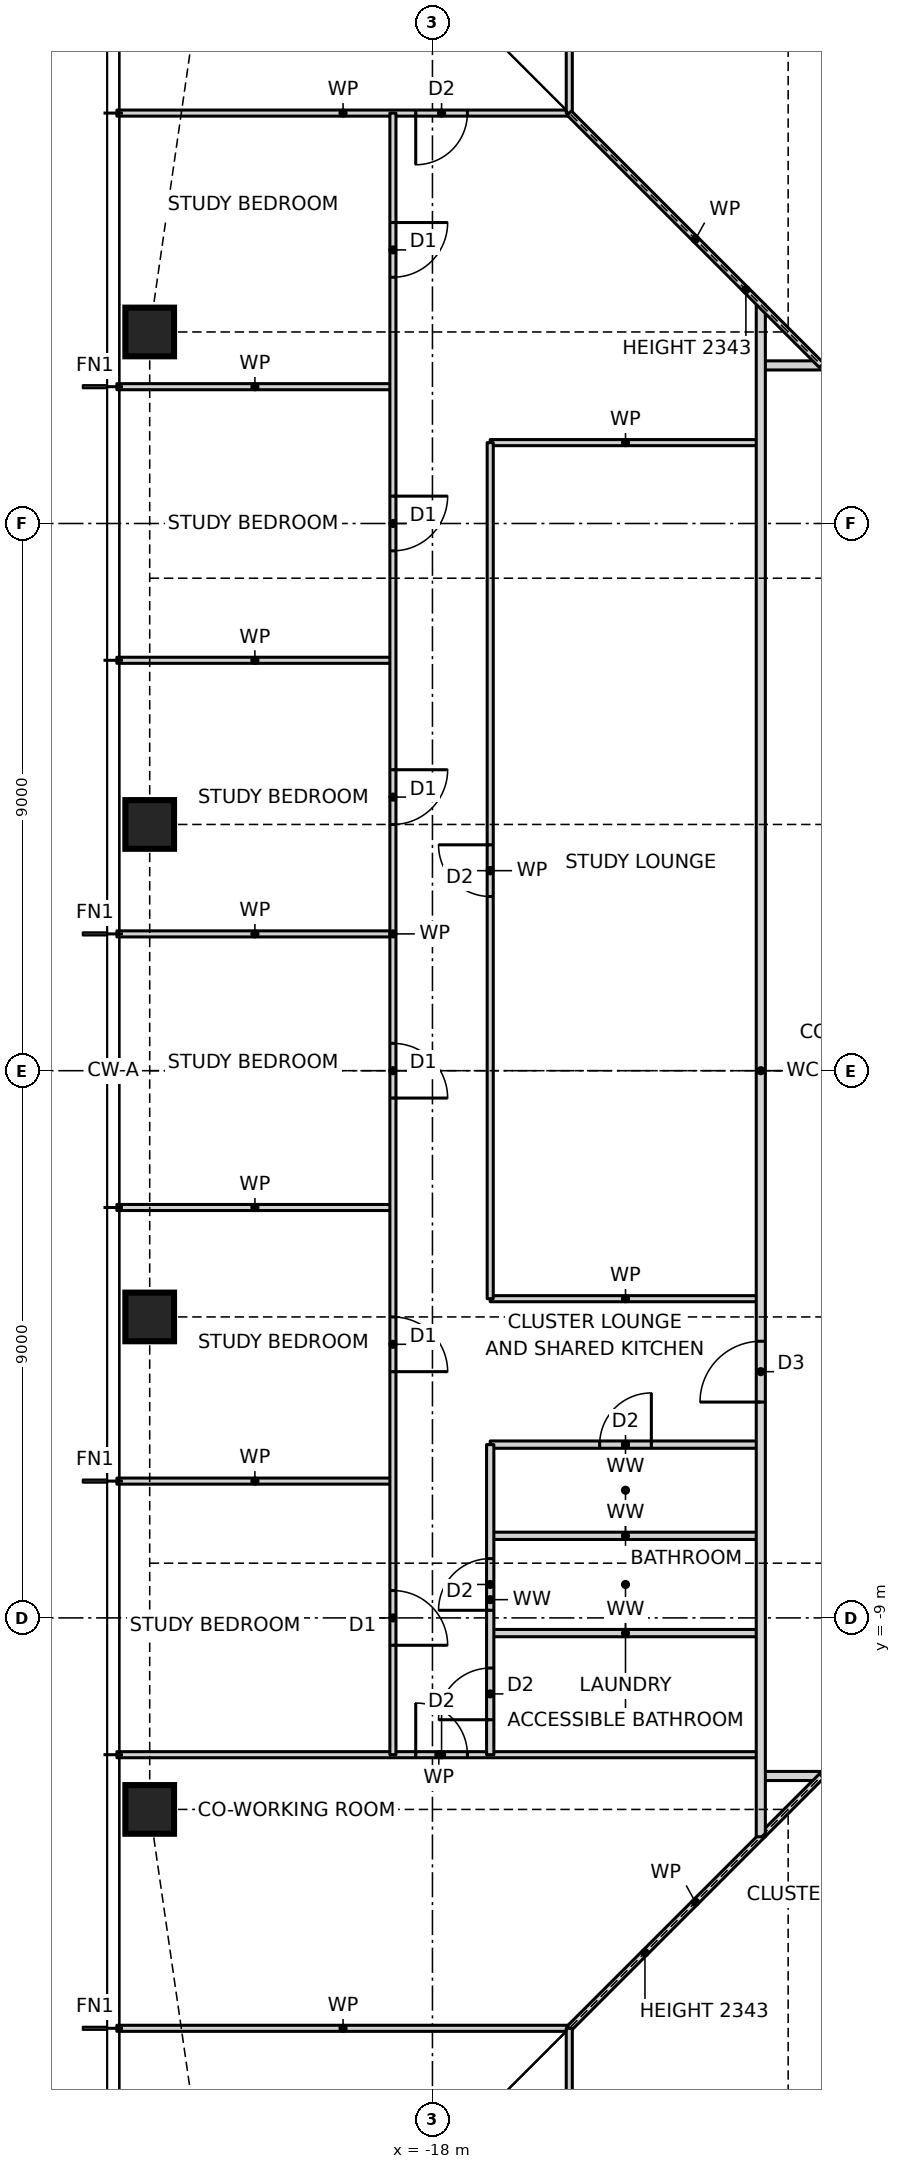
"""IFC4 building model, lengths in metres.
Left out: names, types, materials, properties, quantities, classifications, styles, units other than length and angle.
Written with IfcOpenShell. Run it as: python <this file> out.ifc"""

import sys

from ifc_helpers import new_model, si_unit, direction, frame, frame_2d, origin, origin_2d, place, context, subcontext, project, spatial, rectangle, hollow_rectangle, extrude, element, fill, save


model = new_model("IFC4")
c1 = context("Model", 3, precision=1e-05, world=origin(), true_north=direction((0.0, 1.0)))
c2 = subcontext(c1, "Body", "Model", "MODEL_VIEW")
j1 = project(units=[si_unit("LENGTHUNIT", "METRE"), si_unit("PLANEANGLEUNIT", "RADIAN")], contexts=[c1])
p1 = place(None, origin())
s1 = spatial("IfcSite", under=j1, at=p1, CompositionType="ELEMENT")
p2 = place(p1, origin())
s2 = spatial("IfcBuilding", under=s1, at=p2, CompositionType="ELEMENT")
p3 = place(p2, frame((0.0, 0.0, 50.0)))
s3 = spatial("IfcBuildingStorey", under=s2, at=p3, CompositionType="ELEMENT", Elevation=50.0)
for number, where, z_axis, x_axis in (
    (1, (-22.65, 12.15, 0.0), (0.0, 0.0, 1.0), (1.0, 0.0, 0.0)),
    (2, (-22.65, 4.05, 0.0), (0.0, 0.0, 1.0), (1.0, 0.0, 0.0)),
    (3, (-22.65, -4.05, 0.0), (0.0, 0.0, 1.0), (1.0, 0.0, 0.0)),
    (4, (-22.65, -12.15, 0.0), (0.0, 0.0, 1.0), (1.0, 0.0, 0.0)),
):
    element("IfcColumn", number, at=place(p3, frame(where, z_axis=z_axis, x_axis=x_axis)), inside=s3, PredefinedType="COLUMN", context=c2, shape_type="SweptSolid", body=[
        extrude(hollow_rectangle(XDim=0.8, YDim=0.8, WallThickness=0.09, at=origin_2d()), origin(), (0.0, 0.0, 1.0), 3.5),
    ])
p4 = place(p3, frame((-23.19, -15.75, 0.0), z_axis=(0.0, 0.0, 1.0), x_axis=(1.0, 0.0, 0.0)))
e5 = element("IfcWall", 5, at=p4, inside=s3, PredefinedType="PARTITIONING", context=c2, shape_type="SweptSolid", body=[
    extrude(rectangle(XDim=7.44, YDim=0.1, at=frame_2d((3.72, 0.0))), origin(), (0.0, 0.0, 1.0), 3.27),
])
p5 = place(p3, frame((-12.6, -11.6, 0.0), z_axis=(0.0, 0.0, 1.0), x_axis=(1.0, 0.0, 0.0)))
e6 = element("IfcWall", 6, at=p5, inside=s3, PredefinedType="PARTITIONING", context=c2, shape_type="SweptSolid", body=[
    extrude(rectangle(XDim=24.2, YDim=0.15, at=frame_2d((12.1, 0.0))), origin(), (0.0, 0.0, 1.0), 3.27),
])
p6 = place(p5, frame((1.74, 0.0, 0.0)))
e7 = element("IfcOpeningElement", 7, at=p6, cuts=e6, PredefinedType="OPENING", context=c2, shape_type="SweptSolid", body=[
    extrude(rectangle(XDim=1.0, YDim=2.1, at=frame_2d((0.5, 1.05))), frame((0.0, 0.085, 0.0), z_axis=(0.0, -1.0, 0.0), x_axis=(1.0, 0.0, 0.0)), (0.0, 0.0, 1.0), 0.17),
])
p7 = place(p5, frame((22.025, 0.0, 0.0)))
e8 = element("IfcOpeningElement", 8, at=p7, cuts=e6, PredefinedType="OPENING", context=c2, shape_type="SweptSolid", body=[
    extrude(rectangle(XDim=1.0, YDim=2.1, at=frame_2d((0.5, 1.05))), frame((0.0, 0.085, 0.0), z_axis=(0.0, -1.0, 0.0), x_axis=(1.0, 0.0, 0.0)), (0.0, 0.0, 1.0), 0.17),
])
p8 = place(p3, frame((-23.19, -11.25, 0.0), z_axis=(0.0, 0.0, 1.0), x_axis=(1.0, 0.0, 0.0)))
e9 = element("IfcWall", 9, at=p8, inside=s3, PredefinedType="PARTITIONING", context=c2, shape_type="SweptSolid", body=[
    extrude(rectangle(XDim=10.59, YDim=0.1, at=frame_2d((5.295, 0.0))), origin(), (0.0, 0.0, 1.0), 3.27),
])
p9 = place(p8, frame((4.915, 0.0, 0.0)))
e10 = element("IfcOpeningElement", 10, at=p9, cuts=e9, PredefinedType="OPENING", context=c2, shape_type="SweptSolid", body=[
    extrude(rectangle(XDim=0.85, YDim=2.1, at=frame_2d((0.425, 1.05))), frame((0.0, 0.06, 0.0), z_axis=(0.0, -1.0, 0.0), x_axis=(1.0, 0.0, 0.0)), (0.0, 0.0, 1.0), 0.12),
])
for number, where, z_axis, x_axis in (
    (11, (-17.05, -9.25, 0.0), (0.0, 0.0, 1.0), (1.0, 0.0, 0.0)),
    (12, (-17.05, -7.65, 0.0), (0.0, 0.0, 1.0), (1.0, 0.0, 0.0)),
):
    element("IfcWall", number, at=place(p3, frame(where, z_axis=z_axis, x_axis=x_axis)), inside=s3, PredefinedType="PARTITIONING", context=c2, shape_type="SweptSolid", body=[
        extrude(rectangle(XDim=4.45, YDim=0.12, at=frame_2d((2.225, 0.0))), origin(), (0.0, 0.0, 1.0), 3.27),
    ])
p10 = place(p3, frame((-23.19, -6.75, 0.0), z_axis=(0.0, 0.0, 1.0), x_axis=(1.0, 0.0, 0.0)))
e13 = element("IfcWall", 13, at=p10, inside=s3, PredefinedType="PARTITIONING", context=c2, shape_type="SweptSolid", body=[
    extrude(rectangle(XDim=4.54, YDim=0.1, at=frame_2d((2.27, 0.0))), origin(), (0.0, 0.0, 1.0), 3.27),
])
p11 = place(p3, frame((-17.05, -6.15, 0.0), z_axis=(0.0, 0.0, 1.0), x_axis=(1.0, 0.0, 0.0)))
e14 = element("IfcWall", 14, at=p11, inside=s3, PredefinedType="PARTITIONING", context=c2, shape_type="SweptSolid", body=[
    extrude(rectangle(XDim=4.45, YDim=0.12, at=frame_2d((2.225, 0.0))), origin(), (0.0, 0.0, 1.0), 3.27),
])
p12 = place(p11, frame((1.8, 0.0, 0.0)))
e15 = element("IfcOpeningElement", 15, at=p12, cuts=e14, PredefinedType="OPENING", context=c2, shape_type="SweptSolid", body=[
    extrude(rectangle(XDim=0.85, YDim=2.1, at=frame_2d((0.425, 1.05))), frame((0.0, 0.07, 0.0), z_axis=(0.0, -1.0, 0.0), x_axis=(1.0, 0.0, 0.0)), (0.0, 0.0, 1.0), 0.14),
])
p13 = place(p3, frame((-17.05, -3.75, 0.0), z_axis=(0.0, 0.0, 1.0), x_axis=(1.0, 0.0, 0.0)))
e16 = element("IfcWall", 16, at=p13, inside=s3, PredefinedType="PARTITIONING", context=c2, shape_type="SweptSolid", body=[
    extrude(rectangle(XDim=4.45, YDim=0.1, at=frame_2d((2.225, 0.0))), origin(), (0.0, 0.0, 1.0), 3.27),
])
for number, where, z_axis, x_axis in (
    (17, (-23.19, -2.25, 0.0), (0.0, 0.0, 1.0), (1.0, 0.0, 0.0)),
    (18, (-23.19, 2.25, 0.0), (0.0, 0.0, 1.0), (1.0, 0.0, 0.0)),
    (19, (-23.19, 6.75, 0.0), (0.0, 0.0, 1.0), (1.0, 0.0, 0.0)),
):
    element("IfcWall", number, at=place(p3, frame(where, z_axis=z_axis, x_axis=x_axis)), inside=s3, PredefinedType="PARTITIONING", context=c2, shape_type="SweptSolid", body=[
        extrude(rectangle(XDim=4.54, YDim=0.1, at=frame_2d((2.27, 0.0))), origin(), (0.0, 0.0, 1.0), 3.27),
    ])
p14 = place(p3, frame((-17.05, 10.33, 0.0), z_axis=(0.0, 0.0, 1.0), x_axis=(1.0, 0.0, 0.0)))
e20 = element("IfcWall", 20, at=p14, inside=s3, PredefinedType="PARTITIONING", context=c2, shape_type="SweptSolid", body=[
    extrude(rectangle(XDim=4.45, YDim=0.1, at=frame_2d((2.225, 0.0))), origin(), (0.0, 0.0, 1.0), 3.27),
])
p15 = place(p3, frame((-23.19, 11.25, 0.0), z_axis=(0.0, 0.0, 1.0), x_axis=(1.0, 0.0, 0.0)))
e21 = element("IfcWall", 21, at=p15, inside=s3, PredefinedType="PARTITIONING", context=c2, shape_type="SweptSolid", body=[
    extrude(rectangle(XDim=4.54, YDim=0.1, at=frame_2d((2.27, 0.0))), origin(), (0.0, 0.0, 1.0), 3.27),
])
p16 = place(p3, frame((-12.6, 11.6, 0.0), z_axis=(0.0, 0.0, 1.0), x_axis=(1.0, 0.0, 0.0)))
e22 = element("IfcWall", 22, at=p16, inside=s3, PredefinedType="PARTITIONING", context=c2, shape_type="SweptSolid", body=[
    extrude(rectangle(XDim=24.2, YDim=0.15, at=frame_2d((12.1, 0.0))), origin(), (0.0, 0.0, 1.0), 3.27),
])
p17 = place(p16, frame((7.15, 0.0, 0.0)))
e23 = element("IfcOpeningElement", 23, at=p17, cuts=e22, PredefinedType="OPENING", context=c2, shape_type="SweptSolid", body=[
    extrude(rectangle(XDim=1.0, YDim=2.1, at=frame_2d((0.5, 1.05))), frame((0.0, 0.085, 0.0), z_axis=(0.0, -1.0, 0.0), x_axis=(1.0, 0.0, 0.0)), (0.0, 0.0, 1.0), 0.17),
])
p18 = place(p3, frame((-23.19, 15.75, 0.0), z_axis=(0.0, 0.0, 1.0), x_axis=(1.0, 0.0, 0.0)))
e24 = element("IfcWall", 24, at=p18, inside=s3, PredefinedType="PARTITIONING", context=c2, shape_type="SweptSolid", body=[
    extrude(rectangle(XDim=7.44, YDim=0.1, at=frame_2d((3.72, 0.0))), origin(), (0.0, 0.0, 1.0), 3.27),
])
p19 = place(p18, frame((4.915, 0.0, 0.0)))
e25 = element("IfcOpeningElement", 25, at=p19, cuts=e24, PredefinedType="OPENING", context=c2, shape_type="SweptSolid", body=[
    extrude(rectangle(XDim=0.85, YDim=2.1, at=frame_2d((0.425, 1.05))), frame((0.0, 0.06, 0.0), z_axis=(0.0, -1.0, 0.0), x_axis=(1.0, 0.0, 0.0)), (0.0, 0.0, 1.0), 0.12),
])
p20 = place(p3, frame((-15.75, -15.75, 0.0), z_axis=(0.0, 0.0, 1.0), x_axis=(0.707106781187, 0.707106781187, 0.0)))
e26 = element("IfcWall", 26, at=p20, inside=s3, PredefinedType="PARTITIONING", context=c2, shape_type="SweptSolid", body=[
    extrude(rectangle(XDim=5.869, YDim=0.1, at=frame_2d((2.935, 0.0))), origin(), (0.0, 0.0, 1.0), 2.343),
])
p21 = place(p3, frame((-12.6, -12.6, 0.0), z_axis=(0.0, 0.0, 1.0), x_axis=(0.0, 1.0, 0.0)))
e27 = element("IfcWall", 27, at=p21, inside=s3, PredefinedType="PARTITIONING", context=c2, shape_type="SweptSolid", body=[
    extrude(rectangle(XDim=25.2, YDim=0.15, at=frame_2d((12.6, 0.0))), origin(), (0.0, 0.0, 1.0), 3.27),
])
p22 = place(p21, frame((7.15, 0.0, 0.0)))
e28 = element("IfcOpeningElement", 28, at=p22, cuts=e27, PredefinedType="OPENING", context=c2, shape_type="SweptSolid", body=[
    extrude(rectangle(XDim=1.0, YDim=2.1, at=frame_2d((0.5, 1.05))), frame((0.0, 0.085, 0.0), z_axis=(0.0, -1.0, 0.0), x_axis=(1.0, 0.0, 0.0)), (0.0, 0.0, 1.0), 0.17),
])
p23 = place(p3, frame((-15.75, -23.19, 0.0), z_axis=(0.0, 0.0, 1.0), x_axis=(0.0, 1.0, 0.0)))
e29 = element("IfcWall", 29, at=p23, inside=s3, PredefinedType="PARTITIONING", context=c2, shape_type="SweptSolid", body=[
    extrude(rectangle(XDim=7.44, YDim=0.1, at=frame_2d((3.72, 0.0))), origin(), (0.0, 0.0, 1.0), 3.27),
])
p24 = place(p23, frame((4.915, 0.0, 0.0)))
e30 = element("IfcOpeningElement", 30, at=p24, cuts=e29, PredefinedType="OPENING", context=c2, shape_type="SweptSolid", body=[
    extrude(rectangle(XDim=0.85, YDim=2.1, at=frame_2d((0.425, 1.05))), frame((0.0, 0.06, 0.0), z_axis=(0.0, -1.0, 0.0), x_axis=(1.0, 0.0, 0.0)), (0.0, 0.0, 1.0), 0.12),
])
p25 = place(p3, frame((-15.75, 15.75, 0.0), z_axis=(0.0, 0.0, 1.0), x_axis=(0.0, 1.0, 0.0)))
e31 = element("IfcWall", 31, at=p25, inside=s3, PredefinedType="PARTITIONING", context=c2, shape_type="SweptSolid", body=[
    extrude(rectangle(XDim=7.44, YDim=0.1, at=frame_2d((3.72, 0.0))), origin(), (0.0, 0.0, 1.0), 3.27),
])
p26 = place(p3, frame((-17.05, -11.25, 0.0), z_axis=(0.0, 0.0, 1.0), x_axis=(0.0, 1.0, 0.0)))
e32 = element("IfcWall", 32, at=p26, inside=s3, PredefinedType="PARTITIONING", context=c2, shape_type="SweptSolid", body=[
    extrude(rectangle(XDim=5.1, YDim=0.12, at=frame_2d((2.55, 0.0))), origin(), (0.0, 0.0, 1.0), 3.27),
])
p27 = place(p26, frame((2.375, 0.0, 0.0)))
e33 = element("IfcOpeningElement", 33, at=p27, cuts=e32, PredefinedType="OPENING", context=c2, shape_type="SweptSolid", body=[
    extrude(rectangle(XDim=0.85, YDim=2.1, at=frame_2d((0.425, 1.05))), frame((0.0, 0.07, 0.0), z_axis=(0.0, -1.0, 0.0), x_axis=(1.0, 0.0, 0.0)), (0.0, 0.0, 1.0), 0.14),
])
p28 = place(p26, frame((0.575, 0.0, 0.0)))
e34 = element("IfcOpeningElement", 34, at=p28, cuts=e32, PredefinedType="OPENING", context=c2, shape_type="SweptSolid", body=[
    extrude(rectangle(XDim=0.85, YDim=2.1, at=frame_2d((0.425, 1.05))), frame((0.0, 0.07, 0.0), z_axis=(0.0, -1.0, 0.0), x_axis=(1.0, 0.0, 0.0)), (0.0, 0.0, 1.0), 0.14),
])
p29 = place(p3, frame((-17.05, -3.75, 0.0), z_axis=(0.0, 0.0, 1.0), x_axis=(0.0, 1.0, 0.0)))
e35 = element("IfcWall", 35, at=p29, inside=s3, PredefinedType="PARTITIONING", context=c2, shape_type="SweptSolid", body=[
    extrude(rectangle(XDim=14.08, YDim=0.1, at=frame_2d((7.04, 0.0))), origin(), (0.0, 0.0, 1.0), 3.27),
])
p30 = place(p29, frame((6.615, 0.0, 0.0)))
e36 = element("IfcOpeningElement", 36, at=p30, cuts=e35, PredefinedType="OPENING", context=c2, shape_type="SweptSolid", body=[
    extrude(rectangle(XDim=0.85, YDim=2.1, at=frame_2d((0.425, 1.05))), frame((0.0, 0.06, 0.0), z_axis=(0.0, -1.0, 0.0), x_axis=(1.0, 0.0, 0.0)), (0.0, 0.0, 1.0), 0.12),
])
p31 = place(p3, frame((-18.65, -11.25, 0.0), z_axis=(0.0, 0.0, 1.0), x_axis=(0.0, 1.0, 0.0)))
e37 = element("IfcWall", 37, at=p31, inside=s3, PredefinedType="PARTITIONING", context=c2, shape_type="SweptSolid", body=[
    extrude(rectangle(XDim=27.0, YDim=0.1, at=frame_2d((13.5, 0.0))), origin(), (0.0, 0.0, 1.0), 3.27),
])
p32 = place(p31, frame((24.3, 0.0, 0.0)))
e38 = element("IfcOpeningElement", 38, at=p32, cuts=e37, PredefinedType="OPENING", context=c2, shape_type="SweptSolid", body=[
    extrude(rectangle(XDim=0.9, YDim=2.1, at=frame_2d((0.45, 1.05))), frame((0.0, 0.06, 0.0), z_axis=(0.0, -1.0, 0.0), x_axis=(1.0, 0.0, 0.0)), (0.0, 0.0, 1.0), 0.12),
])
p33 = place(p31, frame((19.8, 0.0, 0.0)))
e39 = element("IfcOpeningElement", 39, at=p33, cuts=e37, PredefinedType="OPENING", context=c2, shape_type="SweptSolid", body=[
    extrude(rectangle(XDim=0.9, YDim=2.1, at=frame_2d((0.45, 1.05))), frame((0.0, 0.06, 0.0), z_axis=(0.0, -1.0, 0.0), x_axis=(1.0, 0.0, 0.0)), (0.0, 0.0, 1.0), 0.12),
])
p34 = place(p31, frame((15.3, 0.0, 0.0)))
e40 = element("IfcOpeningElement", 40, at=p34, cuts=e37, PredefinedType="OPENING", context=c2, shape_type="SweptSolid", body=[
    extrude(rectangle(XDim=0.9, YDim=2.1, at=frame_2d((0.45, 1.05))), frame((0.0, 0.06, 0.0), z_axis=(0.0, -1.0, 0.0), x_axis=(1.0, 0.0, 0.0)), (0.0, 0.0, 1.0), 0.12),
])
p35 = place(p31, frame((10.8, 0.0, 0.0)))
e41 = element("IfcOpeningElement", 41, at=p35, cuts=e37, PredefinedType="OPENING", context=c2, shape_type="SweptSolid", body=[
    extrude(rectangle(XDim=0.9, YDim=2.1, at=frame_2d((0.45, 1.05))), frame((0.0, 0.06, 0.0), z_axis=(0.0, -1.0, 0.0), x_axis=(1.0, 0.0, 0.0)), (0.0, 0.0, 1.0), 0.12),
])
p36 = place(p31, frame((6.3, 0.0, 0.0)))
e42 = element("IfcOpeningElement", 42, at=p36, cuts=e37, PredefinedType="OPENING", context=c2, shape_type="SweptSolid", body=[
    extrude(rectangle(XDim=0.9, YDim=2.1, at=frame_2d((0.45, 1.05))), frame((0.0, 0.06, 0.0), z_axis=(0.0, -1.0, 0.0), x_axis=(1.0, 0.0, 0.0)), (0.0, 0.0, 1.0), 0.12),
])
p37 = place(p31, frame((1.8, 0.0, 0.0)))
e43 = element("IfcOpeningElement", 43, at=p37, cuts=e37, PredefinedType="OPENING", context=c2, shape_type="SweptSolid", body=[
    extrude(rectangle(XDim=0.9, YDim=2.1, at=frame_2d((0.45, 1.05))), frame((0.0, 0.06, 0.0), z_axis=(0.0, -1.0, 0.0), x_axis=(1.0, 0.0, 0.0)), (0.0, 0.0, 1.0), 0.12),
])
p38 = place(p3, frame((-11.6, 11.6, 0.0), z_axis=(0.0, 0.0, 1.0), x_axis=(-0.707106781187, 0.707106781187, 0.0)))
e44 = element("IfcWall", 44, at=p38, inside=s3, PredefinedType="PARTITIONING", context=c2, shape_type="SweptSolid", body=[
    extrude(rectangle(XDim=5.869, YDim=0.1, at=frame_2d((2.935, 0.0))), origin(), (0.0, 0.0, 1.0), 2.343),
])
p39 = place(p32, frame((0.9, 0.0, 0.0), z_axis=(0.0, 0.0, 1.0), x_axis=(-1.0, 0.0, 0.0)))
e45 = element("IfcDoor", 45, at=p39, inside=s3, OperationType="SINGLE_SWING_LEFT", PredefinedType="DOOR", context=c2, shape_type="SweptSolid", body=[
    extrude(rectangle(XDim=0.9, YDim=2.1, at=frame_2d((0.45, 1.05))), frame((0.0, 0.025, 0.0), z_axis=(0.0, -1.0, 0.0), x_axis=(1.0, 0.0, 0.0)), (0.0, 0.0, 1.0), 0.05),
])
fill(e38, e45)
p40 = place(p33, frame((0.9, 0.0, 0.0), z_axis=(0.0, 0.0, 1.0), x_axis=(-1.0, 0.0, 0.0)))
e46 = element("IfcDoor", 46, at=p40, inside=s3, OperationType="SINGLE_SWING_LEFT", PredefinedType="DOOR", context=c2, shape_type="SweptSolid", body=[
    extrude(rectangle(XDim=0.9, YDim=2.1, at=frame_2d((0.45, 1.05))), frame((0.0, 0.025, 0.0), z_axis=(0.0, -1.0, 0.0), x_axis=(1.0, 0.0, 0.0)), (0.0, 0.0, 1.0), 0.05),
])
fill(e39, e46)
p41 = place(p34, frame((0.9, 0.0, 0.0), z_axis=(0.0, 0.0, 1.0), x_axis=(-1.0, 0.0, 0.0)))
e47 = element("IfcDoor", 47, at=p41, inside=s3, OperationType="SINGLE_SWING_LEFT", PredefinedType="DOOR", context=c2, shape_type="SweptSolid", body=[
    extrude(rectangle(XDim=0.9, YDim=2.1, at=frame_2d((0.45, 1.05))), frame((0.0, 0.025, 0.0), z_axis=(0.0, -1.0, 0.0), x_axis=(1.0, 0.0, 0.0)), (0.0, 0.0, 1.0), 0.05),
])
fill(e40, e47)
p42 = place(p35, frame((0.9, 0.0, 0.0), z_axis=(0.0, 0.0, 1.0), x_axis=(-1.0, 0.0, 0.0)))
e48 = element("IfcDoor", 48, at=p42, inside=s3, OperationType="SINGLE_SWING_RIGHT", PredefinedType="DOOR", context=c2, shape_type="SweptSolid", body=[
    extrude(rectangle(XDim=0.9, YDim=2.1, at=frame_2d((0.45, 1.05))), frame((0.0, 0.025, 0.0), z_axis=(0.0, -1.0, 0.0), x_axis=(1.0, 0.0, 0.0)), (0.0, 0.0, 1.0), 0.05),
])
fill(e41, e48)
p43 = place(p36, frame((0.9, 0.0, 0.0), z_axis=(0.0, 0.0, 1.0), x_axis=(-1.0, 0.0, 0.0)))
e49 = element("IfcDoor", 49, at=p43, inside=s3, OperationType="SINGLE_SWING_RIGHT", PredefinedType="DOOR", context=c2, shape_type="SweptSolid", body=[
    extrude(rectangle(XDim=0.9, YDim=2.1, at=frame_2d((0.45, 1.05))), frame((0.0, 0.025, 0.0), z_axis=(0.0, -1.0, 0.0), x_axis=(1.0, 0.0, 0.0)), (0.0, 0.0, 1.0), 0.05),
])
fill(e42, e49)
p44 = place(p37, frame((0.9, 0.0, 0.0), z_axis=(0.0, 0.0, 1.0), x_axis=(-1.0, 0.0, 0.0)))
e50 = element("IfcDoor", 50, at=p44, inside=s3, OperationType="SINGLE_SWING_RIGHT", PredefinedType="DOOR", context=c2, shape_type="SweptSolid", body=[
    extrude(rectangle(XDim=0.9, YDim=2.1, at=frame_2d((0.45, 1.05))), frame((0.0, 0.025, 0.0), z_axis=(0.0, -1.0, 0.0), x_axis=(1.0, 0.0, 0.0)), (0.0, 0.0, 1.0), 0.05),
])
fill(e43, e50)
p45 = place(p22, origin())
e51 = element("IfcDoor", 51, at=p45, inside=s3, OperationType="SINGLE_SWING_LEFT", PredefinedType="DOOR", context=c2, shape_type="SweptSolid", body=[
    extrude(rectangle(XDim=1.0, YDim=2.1, at=frame_2d((0.5, 1.05))), frame((0.0, 0.025, 0.0), z_axis=(0.0, -1.0, 0.0), x_axis=(1.0, 0.0, 0.0)), (0.0, 0.0, 1.0), 0.05),
])
fill(e28, e51)
p46 = place(p30, origin())
e52 = element("IfcDoor", 52, at=p46, inside=s3, OperationType="SINGLE_SWING_RIGHT", PredefinedType="DOOR", context=c2, shape_type="SweptSolid", body=[
    extrude(rectangle(XDim=0.85, YDim=2.1, at=frame_2d((0.425, 1.05))), frame((0.0, 0.025, 0.0), z_axis=(0.0, -1.0, 0.0), x_axis=(1.0, 0.0, 0.0)), (0.0, 0.0, 1.0), 0.05),
])
fill(e36, e52)
p47 = place(p12, origin())
e53 = element("IfcDoor", 53, at=p47, inside=s3, OperationType="SINGLE_SWING_RIGHT", PredefinedType="DOOR", context=c2, shape_type="SweptSolid", body=[
    extrude(rectangle(XDim=0.85, YDim=2.1, at=frame_2d((0.425, 1.05))), frame((0.0, 0.025, 0.0), z_axis=(0.0, -1.0, 0.0), x_axis=(1.0, 0.0, 0.0)), (0.0, 0.0, 1.0), 0.05),
])
fill(e15, e53)
p48 = place(p27, origin())
e54 = element("IfcDoor", 54, at=p48, inside=s3, OperationType="SINGLE_SWING_LEFT", PredefinedType="DOOR", context=c2, shape_type="SweptSolid", body=[
    extrude(rectangle(XDim=0.85, YDim=2.1, at=frame_2d((0.425, 1.05))), frame((0.0, 0.025, 0.0), z_axis=(0.0, -1.0, 0.0), x_axis=(1.0, 0.0, 0.0)), (0.0, 0.0, 1.0), 0.05),
])
fill(e33, e54)
p49 = place(p28, origin())
e55 = element("IfcDoor", 55, at=p49, inside=s3, OperationType="SINGLE_SWING_LEFT", PredefinedType="DOOR", context=c2, shape_type="SweptSolid", body=[
    extrude(rectangle(XDim=0.85, YDim=2.1, at=frame_2d((0.425, 1.05))), frame((0.0, 0.025, 0.0), z_axis=(0.0, -1.0, 0.0), x_axis=(1.0, 0.0, 0.0)), (0.0, 0.0, 1.0), 0.05),
])
fill(e34, e55)
p50 = place(p9, origin())
e56 = element("IfcDoor", 56, at=p50, inside=s3, OperationType="SINGLE_SWING_LEFT", PredefinedType="DOOR", context=c2, shape_type="SweptSolid", body=[
    extrude(rectangle(XDim=0.85, YDim=2.1, at=frame_2d((0.425, 1.05))), frame((0.0, 0.025, 0.0), z_axis=(0.0, -1.0, 0.0), x_axis=(1.0, 0.0, 0.0)), (0.0, 0.0, 1.0), 0.05),
])
fill(e10, e56)
p51 = place(p19, frame((0.85, 0.0, 0.0), z_axis=(0.0, 0.0, 1.0), x_axis=(-1.0, 0.0, 0.0)))
e57 = element("IfcDoor", 57, at=p51, inside=s3, OperationType="SINGLE_SWING_RIGHT", PredefinedType="DOOR", context=c2, shape_type="SweptSolid", body=[
    extrude(rectangle(XDim=0.85, YDim=2.1, at=frame_2d((0.425, 1.05))), frame((0.0, 0.025, 0.0), z_axis=(0.0, -1.0, 0.0), x_axis=(1.0, 0.0, 0.0)), (0.0, 0.0, 1.0), 0.05),
])
fill(e25, e57)
save(model, sys.argv[1])
